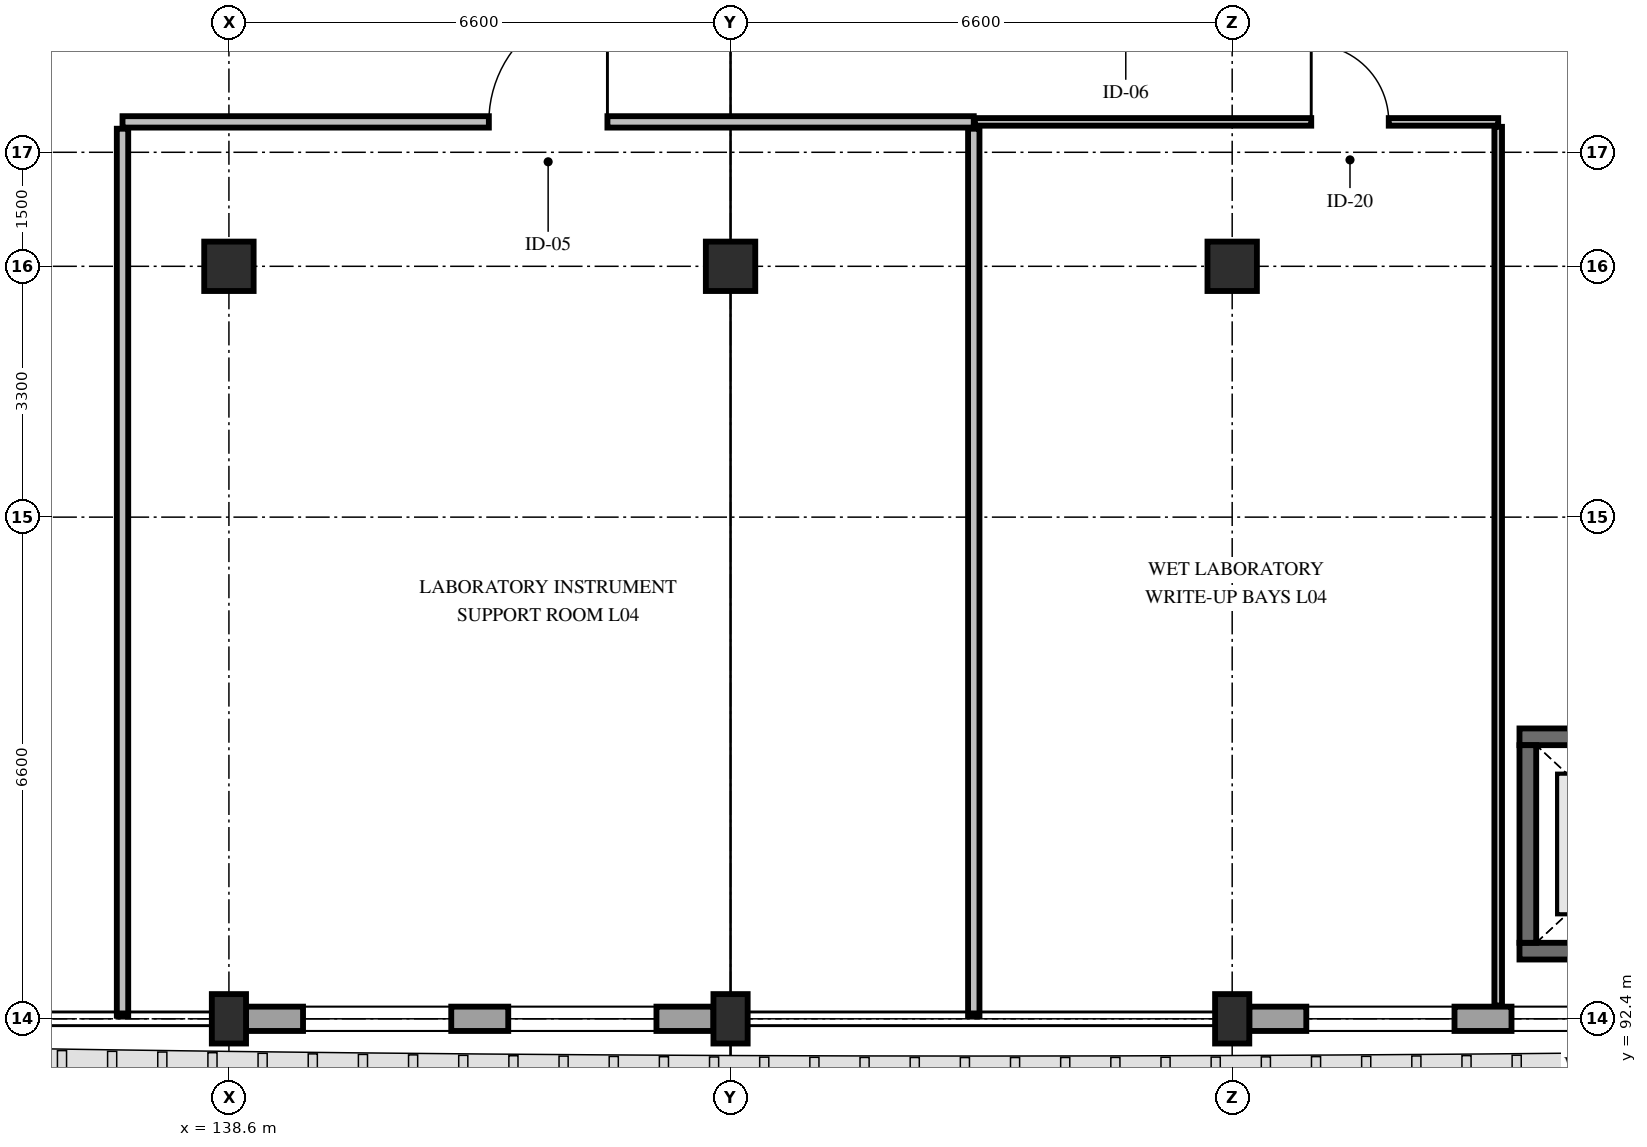
"""IFC4 building model, lengths in metres.
Left out: names, types, materials, properties, quantities, classifications, styles, units other than length and angle.
Written with IfcOpenShell. Run it as: python <this file> out.ifc"""

import sys

from ifc_helpers import new_model, si_unit, direction, frame, frame_2d, origin, origin_2d, place, context, subcontext, project, spatial, rectangle, extrude, element, fill, save


model = new_model("IFC4")
c1 = context("Model", 3, precision=1e-05, world=origin(), true_north=direction((0.0, 1.0)))
c2 = subcontext(c1, "Body", "Model", "MODEL_VIEW")
j1 = project(units=[si_unit("LENGTHUNIT", "METRE"), si_unit("PLANEANGLEUNIT", "RADIAN")], contexts=[c1])
p1 = place(None, origin())
s1 = spatial("IfcSite", under=j1, at=p1, CompositionType="ELEMENT")
p2 = place(p1, origin())
s2 = spatial("IfcBuilding", under=s1, at=p2, CompositionType="ELEMENT")
p3 = place(p2, frame((0.0, 0.0, 19.8)))
s3 = spatial("IfcBuildingStorey", under=s2, at=p3, CompositionType="ELEMENT", Elevation=19.8)
p4 = place(p3, frame((138.6, 92.4, 0.0), z_axis=(0.0, 0.0, 1.0), x_axis=(1.0, 0.0, 0.0)))
e1 = element("IfcColumn", 1, at=p4, inside=s3, PredefinedType="PILASTER", context=c2, shape_type="SweptSolid", body=[
    extrude(rectangle(XDim=0.45, YDim=0.65, at=origin_2d()), origin(), (0.0, 0.0, 1.0), 4.8),
])
p5 = place(p3, frame((138.6, 102.3, 0.0), z_axis=(0.0, 0.0, 1.0), x_axis=(1.0, 0.0, 0.0)))
e2 = element("IfcColumn", 2, at=p5, inside=s3, PredefinedType="COLUMN", context=c2, shape_type="SweptSolid", body=[
    extrude(rectangle(XDim=0.65, YDim=0.65, at=origin_2d()), origin(), (0.0, 0.0, 1.0), 4.8),
])
p6 = place(p3, frame((145.2, 92.4, 0.0), z_axis=(0.0, 0.0, 1.0), x_axis=(1.0, 0.0, 0.0)))
e3 = element("IfcColumn", 3, at=p6, inside=s3, PredefinedType="PILASTER", context=c2, shape_type="SweptSolid", body=[
    extrude(rectangle(XDim=0.45, YDim=0.65, at=origin_2d()), origin(), (0.0, 0.0, 1.0), 4.8),
])
p7 = place(p3, frame((145.2, 102.3, 0.0), z_axis=(0.0, 0.0, 1.0), x_axis=(1.0, 0.0, 0.0)))
e4 = element("IfcColumn", 4, at=p7, inside=s3, PredefinedType="COLUMN", context=c2, shape_type="SweptSolid", body=[
    extrude(rectangle(XDim=0.65, YDim=0.65, at=origin_2d()), origin(), (0.0, 0.0, 1.0), 4.8),
])
p8 = place(p3, frame((151.8, 92.4, 0.0), z_axis=(0.0, 0.0, 1.0), x_axis=(1.0, 0.0, 0.0)))
e5 = element("IfcColumn", 5, at=p8, inside=s3, PredefinedType="PILASTER", context=c2, shape_type="SweptSolid", body=[
    extrude(rectangle(XDim=0.45, YDim=0.65, at=origin_2d()), origin(), (0.0, 0.0, 1.0), 4.8),
])
p9 = place(p3, frame((151.8, 102.3, 0.0), z_axis=(0.0, 0.0, 1.0), x_axis=(1.0, 0.0, 0.0)))
e6 = element("IfcColumn", 6, at=p9, inside=s3, PredefinedType="COLUMN", context=c2, shape_type="SweptSolid", body=[
    extrude(rectangle(XDim=0.65, YDim=0.65, at=origin_2d()), origin(), (0.0, 0.0, 1.0), 4.8),
])
p10 = place(p3, frame((158.175, 92.4, 0.0), z_axis=(0.0, 0.0, 1.0), x_axis=(-1.0, 0.0, 0.0)))
e7 = element("IfcWall", 7, at=p10, inside=s3, PredefinedType="STANDARD", context=c2, shape_type="SweptSolid", body=[
    extrude(rectangle(XDim=6.15, YDim=0.32, at=frame_2d((3.075, 0.0))), origin(), (0.0, 0.0, 1.0), 3.78),
])
p11 = place(p10, frame((0.75, 0.0, 0.85)))
e8 = element("IfcOpeningElement", 8, at=p11, cuts=e7, PredefinedType="OPENING", context=c2, shape_type="SweptSolid", body=[
    extrude(rectangle(XDim=1.95, YDim=2.24, at=frame_2d((0.975, 1.12))), frame((0.0, 0.175, 0.0), z_axis=(0.0, -1.0, 0.0), x_axis=(1.0, 0.0, 0.0)), (0.0, 0.0, 1.0), 0.35),
])
p12 = place(p10, frame((3.45, 0.0, 0.85)))
e9 = element("IfcOpeningElement", 9, at=p12, cuts=e7, PredefinedType="OPENING", context=c2, shape_type="SweptSolid", body=[
    extrude(rectangle(XDim=1.95, YDim=2.24, at=frame_2d((0.975, 1.12))), frame((0.0, 0.175, 0.0), z_axis=(0.0, -1.0, 0.0), x_axis=(1.0, 0.0, 0.0)), (0.0, 0.0, 1.0), 0.35),
])
p13 = place(p3, frame((144.975, 92.4, 0.0), z_axis=(0.0, 0.0, 1.0), x_axis=(-1.0, 0.0, 0.0)))
e10 = element("IfcWall", 10, at=p13, inside=s3, PredefinedType="STANDARD", context=c2, shape_type="SweptSolid", body=[
    extrude(rectangle(XDim=6.15, YDim=0.32, at=frame_2d((3.075, 0.0))), origin(), (0.0, 0.0, 1.0), 3.78),
])
p14 = place(p13, frame((0.75, 0.0, 0.85)))
e11 = element("IfcOpeningElement", 11, at=p14, cuts=e10, PredefinedType="OPENING", context=c2, shape_type="SweptSolid", body=[
    extrude(rectangle(XDim=1.95, YDim=2.24, at=frame_2d((0.975, 1.12))), frame((0.0, 0.175, 0.0), z_axis=(0.0, -1.0, 0.0), x_axis=(1.0, 0.0, 0.0)), (0.0, 0.0, 1.0), 0.35),
])
p15 = place(p13, frame((3.45, 0.0, 0.85)))
e12 = element("IfcOpeningElement", 12, at=p15, cuts=e10, PredefinedType="OPENING", context=c2, shape_type="SweptSolid", body=[
    extrude(rectangle(XDim=1.95, YDim=2.24, at=frame_2d((0.975, 1.12))), frame((0.0, 0.175, 0.0), z_axis=(0.0, -1.0, 0.0), x_axis=(1.0, 0.0, 0.0)), (0.0, 0.0, 1.0), 0.35),
])
p16 = place(p3, frame((155.58, 93.29, 0.0), z_axis=(0.0, 0.0, 1.0), x_axis=(1.0, 0.0, 0.0)))
e13 = element("IfcWall", 13, at=p16, inside=s3, PredefinedType="SHEAR", context=c2, shape_type="SweptSolid", body=[
    extrude(rectangle(XDim=3.24, YDim=0.22, at=frame_2d((1.62, 0.0))), origin(), (0.0, 0.0, 1.0), 4.48),
])
p17 = place(p3, frame((155.58, 96.11, 0.0), z_axis=(0.0, 0.0, 1.0), x_axis=(1.0, 0.0, 0.0)))
e14 = element("IfcWall", 14, at=p17, inside=s3, PredefinedType="SHEAR", context=c2, shape_type="SweptSolid", body=[
    extrude(rectangle(XDim=3.24, YDim=0.22, at=frame_2d((1.62, 0.0))), origin(), (0.0, 0.0, 1.0), 4.48),
])
p18 = place(p17, frame((0.92, 0.0, 0.0)))
e15 = element("IfcOpeningElement", 15, at=p18, cuts=e14, PredefinedType="OPENING", context=c2, shape_type="SweptSolid", body=[
    extrude(rectangle(XDim=1.4, YDim=2.3, at=frame_2d((0.7, 1.15))), frame((0.0, 0.125, 0.0), z_axis=(0.0, -1.0, 0.0), x_axis=(1.0, 0.0, 0.0)), (0.0, 0.0, 1.0), 0.25),
])
p19 = place(p3, frame((155.69, 93.4, 0.0), z_axis=(0.0, 0.0, 1.0), x_axis=(0.0, 1.0, 0.0)))
e16 = element("IfcWall", 16, at=p19, inside=s3, PredefinedType="SHEAR", context=c2, shape_type="SweptSolid", body=[
    extrude(rectangle(XDim=2.6, YDim=0.22, at=frame_2d((1.3, 0.0))), origin(), (0.0, 0.0, 1.0), 4.48),
])
p20 = place(p3, frame((137.2, 104.2, 0.0), z_axis=(0.0, 0.0, 1.0), x_axis=(1.0, 0.0, 0.0)))
e17 = element("IfcWall", 17, at=p20, inside=s3, PredefinedType="PARTITIONING", context=c2, shape_type="SweptSolid", body=[
    extrude(rectangle(XDim=11.2, YDim=0.15, at=frame_2d((5.6, 0.0))), origin(), (0.0, 0.0, 1.0), 3.78),
])
p21 = place(p20, frame((4.82, 0.0, 0.0)))
e18 = element("IfcOpeningElement", 18, at=p21, cuts=e17, PredefinedType="OPENING", context=c2, shape_type="SweptSolid", body=[
    extrude(rectangle(XDim=1.56, YDim=2.3, at=frame_2d((0.78, 1.15))), frame((0.0, 0.09, 0.0), z_axis=(0.0, -1.0, 0.0), x_axis=(1.0, 0.0, 0.0)), (0.0, 0.0, 1.0), 0.18),
])
for number, where, z_axis, x_axis in (
    (19, (137.2, 92.44, 0.0), (0.0, 0.0, 1.0), (0.0, 1.0, 0.0)),
    (20, (148.4, 92.44, 0.0), (0.0, 0.0, 1.0), (0.0, 1.0, 0.0)),
):
    element("IfcWall", number, at=place(p3, frame(where, z_axis=z_axis, x_axis=x_axis)), inside=s3, PredefinedType="PARTITIONING", context=c2, shape_type="SweptSolid", body=[
        extrude(rectangle(XDim=11.67, YDim=0.15, at=frame_2d((5.835, 0.0))), origin(), (0.0, 0.0, 1.0), 3.93),
    ])
p22 = place(p3, frame((148.415, 104.2, 0.0), z_axis=(0.0, 0.0, 1.0), x_axis=(1.0, 0.0, 0.0)))
e21 = element("IfcWall", 21, at=p22, inside=s3, PredefinedType="PARTITIONING", context=c2, shape_type="SweptSolid", body=[
    extrude(rectangle(XDim=6.885, YDim=0.1, at=frame_2d((3.442, 0.0))), origin(), (0.0, 0.0, 1.0), 3.78),
])
p23 = place(p22, frame((4.425, 0.0, 0.0)))
e22 = element("IfcOpeningElement", 22, at=p23, cuts=e21, PredefinedType="OPENING", context=c2, shape_type="SweptSolid", body=[
    extrude(rectangle(XDim=1.02, YDim=2.2, at=frame_2d((0.51, 1.1))), frame((0.0, 0.065, 0.0), z_axis=(0.0, -1.0, 0.0), x_axis=(1.0, 0.0, 0.0)), (0.0, 0.0, 1.0), 0.13),
])
p24 = place(p3, frame((155.3, 92.575, 0.0), z_axis=(0.0, 0.0, 1.0), x_axis=(0.0, 1.0, 0.0)))
e23 = element("IfcWall", 23, at=p24, inside=s3, PredefinedType="PARTITIONING", context=c2, shape_type="SweptSolid", body=[
    extrude(rectangle(XDim=11.56, YDim=0.1, at=frame_2d((5.78, 0.0))), origin(), (0.0, 0.0, 1.0), 3.93),
])
p25 = place(p11, origin())
e24 = element("IfcWindow", 24, at=p25, inside=s3, PartitioningType="DOUBLE_PANEL_VERTICAL", PredefinedType="WINDOW", context=c2, shape_type="SweptSolid", body=[
    extrude(rectangle(XDim=1.95, YDim=2.24, at=frame_2d((0.975, 1.12))), frame((0.0, 0.03, 0.0), z_axis=(0.0, -1.0, 0.0), x_axis=(1.0, 0.0, 0.0)), (0.0, 0.0, 1.0), 0.06),
])
fill(e8, e24)
p26 = place(p12, origin())
e25 = element("IfcWindow", 25, at=p26, inside=s3, PartitioningType="DOUBLE_PANEL_VERTICAL", PredefinedType="WINDOW", context=c2, shape_type="SweptSolid", body=[
    extrude(rectangle(XDim=1.95, YDim=2.24, at=frame_2d((0.975, 1.12))), frame((0.0, 0.03, 0.0), z_axis=(0.0, -1.0, 0.0), x_axis=(1.0, 0.0, 0.0)), (0.0, 0.0, 1.0), 0.06),
])
fill(e9, e25)
p27 = place(p14, origin())
e26 = element("IfcWindow", 26, at=p27, inside=s3, PartitioningType="DOUBLE_PANEL_VERTICAL", PredefinedType="WINDOW", context=c2, shape_type="SweptSolid", body=[
    extrude(rectangle(XDim=1.95, YDim=2.24, at=frame_2d((0.975, 1.12))), frame((0.0, 0.03, 0.0), z_axis=(0.0, -1.0, 0.0), x_axis=(1.0, 0.0, 0.0)), (0.0, 0.0, 1.0), 0.06),
])
fill(e11, e26)
p28 = place(p15, origin())
e27 = element("IfcWindow", 27, at=p28, inside=s3, PartitioningType="DOUBLE_PANEL_VERTICAL", PredefinedType="WINDOW", context=c2, shape_type="SweptSolid", body=[
    extrude(rectangle(XDim=1.95, YDim=2.24, at=frame_2d((0.975, 1.12))), frame((0.0, 0.03, 0.0), z_axis=(0.0, -1.0, 0.0), x_axis=(1.0, 0.0, 0.0)), (0.0, 0.0, 1.0), 0.06),
])
fill(e12, e27)
p29 = place(p21, origin())
e28 = element("IfcDoor", 28, at=p29, inside=s3, OperationType="SINGLE_SWING_RIGHT", PredefinedType="DOOR", context=c2, shape_type="SweptSolid", body=[
    extrude(rectangle(XDim=1.56, YDim=2.3, at=frame_2d((0.78, 1.15))), frame((0.0, 0.025, 0.0), z_axis=(0.0, -1.0, 0.0), x_axis=(1.0, 0.0, 0.0)), (0.0, 0.0, 1.0), 0.05),
])
fill(e18, e28)
p30 = place(p23, origin())
e29 = element("IfcDoor", 29, at=p30, inside=s3, OperationType="SINGLE_SWING_LEFT", PredefinedType="DOOR", context=c2, shape_type="SweptSolid", body=[
    extrude(rectangle(XDim=1.02, YDim=2.2, at=frame_2d((0.51, 1.1))), frame((0.0, 0.025, 0.0), z_axis=(0.0, -1.0, 0.0), x_axis=(1.0, 0.0, 0.0)), (0.0, 0.0, 1.0), 0.05),
])
fill(e22, e29)
save(model, sys.argv[1])
